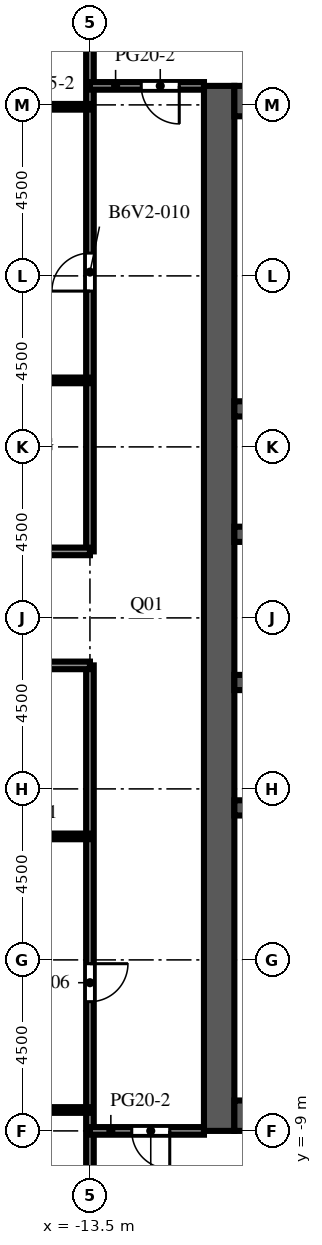
"""IFC4 building model, lengths in metres.
Left out: names, types, materials, properties, quantities, classifications, styles, units other than length and angle.
Written with IfcOpenShell. Run it as: python <this file> out.ifc"""

import sys

from ifc_helpers import new_model, si_unit, direction, frame, frame_2d, origin, place, context, subcontext, project, spatial, rectangle, extrude, element, fill, save


model = new_model("IFC4")
c1 = context("Model", 3, precision=1e-05, world=origin(), true_north=direction((0.0, 1.0)))
c2 = subcontext(c1, "Body", "Model", "MODEL_VIEW")
j1 = project(units=[si_unit("LENGTHUNIT", "METRE"), si_unit("PLANEANGLEUNIT", "RADIAN")], contexts=[c1])
p1 = place(None, origin())
s1 = spatial("IfcSite", under=j1, at=p1, CompositionType="ELEMENT")
p2 = place(p1, origin())
s2 = spatial("IfcBuilding", under=s1, at=p2, CompositionType="ELEMENT")
p3 = place(p2, frame((0.0, 0.0, 216.1)))
s3 = spatial("IfcBuildingStorey", under=s2, at=p3, CompositionType="ELEMENT", Elevation=216.1)
p4 = place(p3, frame((-10.1, -9.0, 0.0), z_axis=(0.0, 0.0, 1.0), x_axis=(0.0, 1.0, 0.0)))
e1 = element("IfcWall", 1, at=p4, inside=s3, PredefinedType="SHEAR", context=c2, shape_type="SweptSolid", body=[
    extrude(rectangle(XDim=27.5, YDim=0.8, at=frame_2d((13.75, 0.0))), origin(), (0.0, 0.0, 1.0), 4.1),
])
p5 = place(p4, frame((12.55, 0.0, 0.0)))
e2 = element("IfcOpeningElement", 2, at=p5, cuts=e1, PredefinedType="OPENING", context=c2, shape_type="SweptSolid", body=[
    extrude(rectangle(XDim=2.4, YDim=2.4, at=frame_2d((1.2, 1.2))), frame((0.0, 0.41, 0.0), z_axis=(0.0, -1.0, 0.0), x_axis=(1.0, 0.0, 0.0)), (0.0, 0.0, 1.0), 0.82),
])
p6 = place(p4, frame((6.825, 0.0, 0.0)))
e3 = element("IfcOpeningElement", 3, at=p6, cuts=e1, PredefinedType="OPENING", context=c2, shape_type="SweptSolid", body=[
    extrude(rectangle(XDim=1.2, YDim=2.1, at=frame_2d((0.6, 1.05))), frame((0.0, 0.41, 0.0), z_axis=(0.0, -1.0, 0.0), x_axis=(1.0, 0.0, 0.0)), (0.0, 0.0, 1.0), 0.82),
])
p7 = place(p4, frame((19.475, 0.0, 0.0)))
e4 = element("IfcOpeningElement", 4, at=p7, cuts=e1, PredefinedType="OPENING", context=c2, shape_type="SweptSolid", body=[
    extrude(rectangle(XDim=1.2, YDim=2.1, at=frame_2d((0.6, 1.05))), frame((0.0, 0.41, 0.0), z_axis=(0.0, -1.0, 0.0), x_axis=(1.0, 0.0, 0.0)), (0.0, 0.0, 1.0), 0.82),
])
for number, where, z_axis, x_axis in (
    (5, (-9.7, -8.6, 0.0), (0.0, 0.0, 1.0), (1.0, 0.0, 0.0)),
    (6, (-9.7, 18.1, 0.0), (0.0, 0.0, 1.0), (1.0, 0.0, 0.0)),
):
    element("IfcWall", number, at=place(p3, frame(where, z_axis=z_axis, x_axis=x_axis)), inside=s3, PredefinedType="SHEAR", context=c2, shape_type="SweptSolid", body=[
        extrude(rectangle(XDim=10.4, YDim=0.8, at=frame_2d((5.2, 0.0))), origin(), (0.0, 0.0, 1.0), 4.1),
    ])
p8 = place(p3, frame((-9.7, -0.5, 0.0), z_axis=(0.0, 0.0, 1.0), x_axis=(1.0, 0.0, 0.0)))
e7 = element("IfcWall", 7, at=p8, inside=s3, PredefinedType="SHEAR", context=c2, shape_type="SweptSolid", body=[
    extrude(rectangle(XDim=10.4, YDim=0.4, at=frame_2d((5.2, 0.0))), origin(), (0.0, 0.0, 1.0), 4.1),
])
p9 = place(p3, frame((-9.7, 2.8, 0.0), z_axis=(0.0, 0.0, 1.0), x_axis=(1.0, 0.0, 0.0)))
e8 = element("IfcWall", 8, at=p9, inside=s3, PredefinedType="SHEAR", context=c2, shape_type="SweptSolid", body=[
    extrude(rectangle(XDim=10.4, YDim=0.4, at=frame_2d((5.2, 0.0))), origin(), (0.0, 0.0, 1.0), 4.1),
])
p10 = place(p9, frame((0.738, 0.0, 0.0)))
e9 = element("IfcOpeningElement", 9, at=p10, cuts=e8, PredefinedType="OPENING", context=c2, shape_type="SweptSolid", body=[
    extrude(rectangle(XDim=1.1, YDim=2.1, at=frame_2d((0.55, 1.05))), frame((0.0, 0.21, 0.0), z_axis=(0.0, -1.0, 0.0), x_axis=(1.0, 0.0, 0.0)), (0.0, 0.0, 1.0), 0.42),
])
p11 = place(p9, frame((3.337, 0.0, 0.0)))
e10 = element("IfcOpeningElement", 10, at=p11, cuts=e8, PredefinedType="OPENING", context=c2, shape_type="SweptSolid", body=[
    extrude(rectangle(XDim=1.1, YDim=2.1, at=frame_2d((0.55, 1.05))), frame((0.0, 0.21, 0.0), z_axis=(0.0, -1.0, 0.0), x_axis=(1.0, 0.0, 0.0)), (0.0, 0.0, 1.0), 0.42),
])
p12 = place(p9, frame((6.012, 0.0, 0.0)))
e11 = element("IfcOpeningElement", 11, at=p12, cuts=e8, PredefinedType="OPENING", context=c2, shape_type="SweptSolid", body=[
    extrude(rectangle(XDim=1.0, YDim=2.1, at=frame_2d((0.5, 1.05))), frame((0.0, 0.21, 0.0), z_axis=(0.0, -1.0, 0.0), x_axis=(1.0, 0.0, 0.0)), (0.0, 0.0, 1.0), 0.42),
])
p13 = place(p9, frame((8.613, 0.0, 0.0)))
e12 = element("IfcOpeningElement", 12, at=p13, cuts=e8, PredefinedType="OPENING", context=c2, shape_type="SweptSolid", body=[
    extrude(rectangle(XDim=1.0, YDim=2.1, at=frame_2d((0.5, 1.05))), frame((0.0, 0.21, 0.0), z_axis=(0.0, -1.0, 0.0), x_axis=(1.0, 0.0, 0.0)), (0.0, 0.0, 1.0), 0.42),
])
p14 = place(p3, frame((-9.7, 6.7, 0.0), z_axis=(0.0, 0.0, 1.0), x_axis=(1.0, 0.0, 0.0)))
e13 = element("IfcWall", 13, at=p14, inside=s3, PredefinedType="SHEAR", context=c2, shape_type="SweptSolid", body=[
    extrude(rectangle(XDim=10.4, YDim=0.4, at=frame_2d((5.2, 0.0))), origin(), (0.0, 0.0, 1.0), 4.1),
])
p15 = place(p14, frame((3.337, 0.0, 0.0)))
e14 = element("IfcOpeningElement", 14, at=p15, cuts=e13, PredefinedType="OPENING", context=c2, shape_type="SweptSolid", body=[
    extrude(rectangle(XDim=1.1, YDim=2.1, at=frame_2d((0.55, 1.05))), frame((0.0, 0.21, 0.0), z_axis=(0.0, -1.0, 0.0), x_axis=(1.0, 0.0, 0.0)), (0.0, 0.0, 1.0), 0.42),
])
p16 = place(p14, frame((5.962, 0.0, 0.0)))
e15 = element("IfcOpeningElement", 15, at=p16, cuts=e13, PredefinedType="OPENING", context=c2, shape_type="SweptSolid", body=[
    extrude(rectangle(XDim=1.1, YDim=2.1, at=frame_2d((0.55, 1.05))), frame((0.0, 0.21, 0.0), z_axis=(0.0, -1.0, 0.0), x_axis=(1.0, 0.0, 0.0)), (0.0, 0.0, 1.0), 0.42),
])
p17 = place(p14, frame((8.663, 0.0, 0.0)))
e16 = element("IfcOpeningElement", 16, at=p17, cuts=e13, PredefinedType="OPENING", context=c2, shape_type="SweptSolid", body=[
    extrude(rectangle(XDim=1.1, YDim=2.1, at=frame_2d((0.55, 1.05))), frame((0.0, 0.21, 0.0), z_axis=(0.0, -1.0, 0.0), x_axis=(1.0, 0.0, 0.0)), (0.0, 0.0, 1.0), 0.42),
])
p18 = place(p14, frame((0.688, 0.0, 0.0)))
e17 = element("IfcOpeningElement", 17, at=p18, cuts=e13, PredefinedType="OPENING", context=c2, shape_type="SweptSolid", body=[
    extrude(rectangle(XDim=1.0, YDim=2.1, at=frame_2d((0.5, 1.05))), frame((0.0, 0.21, 0.0), z_axis=(0.0, -1.0, 0.0), x_axis=(1.0, 0.0, 0.0)), (0.0, 0.0, 1.0), 0.42),
])
p19 = place(p3, frame((-9.7, 10.0, 0.0), z_axis=(0.0, 0.0, 1.0), x_axis=(1.0, 0.0, 0.0)))
e18 = element("IfcWall", 18, at=p19, inside=s3, PredefinedType="SHEAR", context=c2, shape_type="SweptSolid", body=[
    extrude(rectangle(XDim=10.4, YDim=0.4, at=frame_2d((5.2, 0.0))), origin(), (0.0, 0.0, 1.0), 4.1),
])
p20 = place(p3, frame((-13.5, -26.5, 0.0), z_axis=(0.0, 0.0, 1.0), x_axis=(0.0, 1.0, 0.0)))
e19 = element("IfcWall", 19, at=p20, inside=s3, PredefinedType="PARTITIONING", context=c2, shape_type="SweptSolid", body=[
    extrude(rectangle(XDim=29.75, YDim=0.2, at=frame_2d((14.875, 0.0))), origin(), (0.0, 0.0, 1.0), 3.5),
])
p21 = place(p20, frame((20.9, 0.0, 0.0)))
e20 = element("IfcOpeningElement", 20, at=p21, cuts=e19, PredefinedType="OPENING", context=c2, shape_type="SweptSolid", body=[
    extrude(rectangle(XDim=1.0, YDim=2.1, at=frame_2d((0.5, 1.05))), frame((0.0, 0.11, 0.0), z_axis=(0.0, -1.0, 0.0), x_axis=(1.0, 0.0, 0.0)), (0.0, 0.0, 1.0), 0.22),
])
p22 = place(p3, frame((-13.5, 6.25, 0.0), z_axis=(0.0, 0.0, 1.0), x_axis=(0.0, 1.0, 0.0)))
e21 = element("IfcWall", 21, at=p22, inside=s3, PredefinedType="PARTITIONING", context=c2, shape_type="SweptSolid", body=[
    extrude(rectangle(XDim=20.25, YDim=0.2, at=frame_2d((10.125, 0.0))), origin(), (0.0, 0.0, 1.0), 3.5),
])
p23 = place(p22, frame((6.85, 0.0, 0.0)))
e22 = element("IfcOpeningElement", 22, at=p23, cuts=e21, PredefinedType="OPENING", context=c2, shape_type="SweptSolid", body=[
    extrude(rectangle(XDim=1.0, YDim=2.1, at=frame_2d((0.5, 1.05))), frame((0.0, 0.11, 0.0), z_axis=(0.0, -1.0, 0.0), x_axis=(1.0, 0.0, 0.0)), (0.0, 0.0, 1.0), 0.22),
])
p24 = place(p3, frame((-10.5, -9.0, 0.0), z_axis=(0.0, 0.0, 1.0), x_axis=(-1.0, 0.0, 0.0)))
e23 = element("IfcWall", 23, at=p24, inside=s3, PredefinedType="PARTITIONING", context=c2, shape_type="SweptSolid", body=[
    extrude(rectangle(XDim=3.0, YDim=0.2, at=frame_2d((1.5, 0.0))), origin(), (0.0, 0.0, 1.0), 3.5),
])
p25 = place(p24, frame((0.9, 0.0, 0.0)))
e24 = element("IfcOpeningElement", 24, at=p25, cuts=e23, PredefinedType="OPENING", context=c2, shape_type="SweptSolid", body=[
    extrude(rectangle(XDim=1.0, YDim=2.1, at=frame_2d((0.5, 1.05))), frame((0.0, 0.11, 0.0), z_axis=(0.0, -1.0, 0.0), x_axis=(1.0, 0.0, 0.0)), (0.0, 0.0, 1.0), 0.22),
])
p26 = place(p3, frame((-13.5, -8.45, 0.0), z_axis=(0.0, 0.0, 1.0), x_axis=(-1.0, 0.0, 0.0)))
e25 = element("IfcWall", 25, at=p26, inside=s3, PredefinedType="PARTITIONING", context=c2, shape_type="SweptSolid", body=[
    extrude(rectangle(XDim=3.9, YDim=0.15, at=frame_2d((1.95, 0.0))), origin(), (0.0, 0.0, 1.0), 3.5),
])
p27 = place(p26, frame((2.15, 0.0, 0.0)))
e26 = element("IfcOpeningElement", 26, at=p27, cuts=e25, PredefinedType="OPENING", context=c2, shape_type="SweptSolid", body=[
    extrude(rectangle(XDim=1.0, YDim=2.1, at=frame_2d((0.5, 1.05))), frame((0.0, 0.085, 0.0), z_axis=(0.0, -1.0, 0.0), x_axis=(1.0, 0.0, 0.0)), (0.0, 0.0, 1.0), 0.17),
])
p28 = place(p3, frame((-13.5, -1.25, 0.0), z_axis=(0.0, 0.0, 1.0), x_axis=(-1.0, 0.0, 0.0)))
e27 = element("IfcWall", 27, at=p28, inside=s3, PredefinedType="PARTITIONING", context=c2, shape_type="SweptSolid", body=[
    extrude(rectangle(XDim=8.85, YDim=0.15, at=frame_2d((4.425, 0.0))), origin(), (0.0, 0.0, 1.0), 3.5),
])
p29 = place(p28, frame((6.65, 0.0, 0.0)))
e28 = element("IfcOpeningElement", 28, at=p29, cuts=e27, PredefinedType="OPENING", context=c2, shape_type="SweptSolid", body=[
    extrude(rectangle(XDim=1.0, YDim=2.1, at=frame_2d((0.5, 1.05))), frame((0.0, 0.085, 0.0), z_axis=(0.0, -1.0, 0.0), x_axis=(1.0, 0.0, 0.0)), (0.0, 0.0, 1.0), 0.17),
])
p30 = place(p28, frame((1.4, 0.0, 0.0)))
e29 = element("IfcOpeningElement", 29, at=p30, cuts=e27, PredefinedType="OPENING", context=c2, shape_type="SweptSolid", body=[
    extrude(rectangle(XDim=1.0, YDim=2.1, at=frame_2d((0.5, 1.05))), frame((0.0, 0.085, 0.0), z_axis=(0.0, -1.0, 0.0), x_axis=(1.0, 0.0, 0.0)), (0.0, 0.0, 1.0), 0.17),
])
p31 = place(p3, frame((-13.5, 3.25, 0.0), z_axis=(0.0, 0.0, 1.0), x_axis=(-1.0, 0.0, 0.0)))
e30 = element("IfcWall", 30, at=p31, inside=s3, PredefinedType="PARTITIONING", context=c2, shape_type="SweptSolid", body=[
    extrude(rectangle(XDim=8.85, YDim=0.2, at=frame_2d((4.425, 0.0))), origin(), (0.0, 0.0, 1.0), 3.5),
])
p32 = place(p31, frame((6.65, 0.0, 0.0)))
e31 = element("IfcOpeningElement", 31, at=p32, cuts=e30, PredefinedType="OPENING", context=c2, shape_type="SweptSolid", body=[
    extrude(rectangle(XDim=1.0, YDim=2.1, at=frame_2d((0.5, 1.05))), frame((0.0, 0.11, 0.0), z_axis=(0.0, -1.0, 0.0), x_axis=(1.0, 0.0, 0.0)), (0.0, 0.0, 1.0), 0.22),
])
p33 = place(p3, frame((-22.35, 6.25, 0.0), z_axis=(0.0, 0.0, 1.0), x_axis=(1.0, 0.0, 0.0)))
e32 = element("IfcWall", 32, at=p33, inside=s3, PredefinedType="PARTITIONING", context=c2, shape_type="SweptSolid", body=[
    extrude(rectangle(XDim=8.85, YDim=0.2, at=frame_2d((4.425, 0.0))), origin(), (0.0, 0.0, 1.0), 3.5),
])
p34 = place(p33, frame((1.2, 0.0, 0.0)))
e33 = element("IfcOpeningElement", 33, at=p34, cuts=e32, PredefinedType="OPENING", context=c2, shape_type="SweptSolid", body=[
    extrude(rectangle(XDim=1.0, YDim=2.1, at=frame_2d((0.5, 1.05))), frame((0.0, 0.11, 0.0), z_axis=(0.0, -1.0, 0.0), x_axis=(1.0, 0.0, 0.0)), (0.0, 0.0, 1.0), 0.22),
])
p35 = place(p3, frame((-22.35, 10.75, 0.0), z_axis=(0.0, 0.0, 1.0), x_axis=(1.0, 0.0, 0.0)))
e34 = element("IfcWall", 34, at=p35, inside=s3, PredefinedType="PARTITIONING", context=c2, shape_type="SweptSolid", body=[
    extrude(rectangle(XDim=8.85, YDim=0.15, at=frame_2d((4.425, 0.0))), origin(), (0.0, 0.0, 1.0), 3.5),
])
p36 = place(p35, frame((1.2, 0.0, 0.0)))
e35 = element("IfcOpeningElement", 35, at=p36, cuts=e34, PredefinedType="OPENING", context=c2, shape_type="SweptSolid", body=[
    extrude(rectangle(XDim=1.0, YDim=2.1, at=frame_2d((0.5, 1.05))), frame((0.0, 0.085, 0.0), z_axis=(0.0, -1.0, 0.0), x_axis=(1.0, 0.0, 0.0)), (0.0, 0.0, 1.0), 0.17),
])
p37 = place(p35, frame((5.7, 0.0, 0.0)))
e36 = element("IfcOpeningElement", 36, at=p37, cuts=e34, PredefinedType="OPENING", context=c2, shape_type="SweptSolid", body=[
    extrude(rectangle(XDim=1.0, YDim=2.1, at=frame_2d((0.5, 1.05))), frame((0.0, 0.085, 0.0), z_axis=(0.0, -1.0, 0.0), x_axis=(1.0, 0.0, 0.0)), (0.0, 0.0, 1.0), 0.17),
])
p38 = place(p3, frame((-17.4, 17.95, 0.0), z_axis=(0.0, 0.0, 1.0), x_axis=(1.0, 0.0, 0.0)))
e37 = element("IfcWall", 37, at=p38, inside=s3, PredefinedType="PARTITIONING", context=c2, shape_type="SweptSolid", body=[
    extrude(rectangle(XDim=3.9, YDim=0.15, at=frame_2d((1.95, 0.0))), origin(), (0.0, 0.0, 1.0), 3.5),
])
p39 = place(p38, frame((0.5, 0.0, 0.0)))
e38 = element("IfcOpeningElement", 38, at=p39, cuts=e37, PredefinedType="OPENING", context=c2, shape_type="SweptSolid", body=[
    extrude(rectangle(XDim=1.0, YDim=2.1, at=frame_2d((0.5, 1.05))), frame((0.0, 0.085, 0.0), z_axis=(0.0, -1.0, 0.0), x_axis=(1.0, 0.0, 0.0)), (0.0, 0.0, 1.0), 0.17),
])
p40 = place(p3, frame((-13.5, 18.5, 0.0), z_axis=(0.0, 0.0, 1.0), x_axis=(1.0, 0.0, 0.0)))
e39 = element("IfcWall", 39, at=p40, inside=s3, PredefinedType="PARTITIONING", context=c2, shape_type="SweptSolid", body=[
    extrude(rectangle(XDim=3.0, YDim=0.2, at=frame_2d((1.5, 0.0))), origin(), (0.0, 0.0, 1.0), 3.5),
])
p41 = place(p40, frame((1.35, 0.0, 0.0)))
e40 = element("IfcOpeningElement", 40, at=p41, cuts=e39, PredefinedType="OPENING", context=c2, shape_type="SweptSolid", body=[
    extrude(rectangle(XDim=1.0, YDim=2.1, at=frame_2d((0.5, 1.05))), frame((0.0, 0.11, 0.0), z_axis=(0.0, -1.0, 0.0), x_axis=(1.0, 0.0, 0.0)), (0.0, 0.0, 1.0), 0.22),
])
p42 = place(p5, origin())
e41 = element("IfcDoor", 41, at=p42, inside=s3, OperationType="DOUBLE_DOOR_DOUBLE_SWING", PredefinedType="DOOR", context=c2, shape_type="SweptSolid", body=[
    extrude(rectangle(XDim=2.4, YDim=2.4, at=frame_2d((1.2, 1.2))), frame((0.0, 0.025, 0.0), z_axis=(0.0, -1.0, 0.0), x_axis=(1.0, 0.0, 0.0)), (0.0, 0.0, 1.0), 0.05),
])
fill(e2, e41)
p43 = place(p6, origin())
e42 = element("IfcDoor", 42, at=p43, inside=s3, OperationType="SINGLE_SWING_LEFT", PredefinedType="DOOR", context=c2, shape_type="SweptSolid", body=[
    extrude(rectangle(XDim=1.2, YDim=2.1, at=frame_2d((0.6, 1.05))), frame((0.0, 0.025, 0.0), z_axis=(0.0, -1.0, 0.0), x_axis=(1.0, 0.0, 0.0)), (0.0, 0.0, 1.0), 0.05),
])
fill(e3, e42)
p44 = place(p7, origin())
e43 = element("IfcDoor", 43, at=p44, inside=s3, OperationType="SINGLE_SWING_LEFT", PredefinedType="DOOR", context=c2, shape_type="SweptSolid", body=[
    extrude(rectangle(XDim=1.2, YDim=2.1, at=frame_2d((0.6, 1.05))), frame((0.0, 0.025, 0.0), z_axis=(0.0, -1.0, 0.0), x_axis=(1.0, 0.0, 0.0)), (0.0, 0.0, 1.0), 0.05),
])
fill(e4, e43)
p45 = place(p21, origin())
e44 = element("IfcDoor", 44, at=p45, inside=s3, OperationType="SINGLE_SWING_RIGHT", PredefinedType="DOOR", context=c2, shape_type="SweptSolid", body=[
    extrude(rectangle(XDim=1.0, YDim=2.1, at=frame_2d((0.5, 1.05))), frame((0.0, 0.025, 0.0), z_axis=(0.0, -1.0, 0.0), x_axis=(1.0, 0.0, 0.0)), (0.0, 0.0, 1.0), 0.05),
])
fill(e20, e44)
p46 = place(p23, origin())
e45 = element("IfcDoor", 45, at=p46, inside=s3, OperationType="SINGLE_SWING_LEFT", PredefinedType="DOOR", context=c2, shape_type="SweptSolid", body=[
    extrude(rectangle(XDim=1.0, YDim=2.1, at=frame_2d((0.5, 1.05))), frame((0.0, 0.025, 0.0), z_axis=(0.0, -1.0, 0.0), x_axis=(1.0, 0.0, 0.0)), (0.0, 0.0, 1.0), 0.05),
])
fill(e22, e45)
p47 = place(p25, origin())
e46 = element("IfcDoor", 46, at=p47, inside=s3, OperationType="SINGLE_SWING_LEFT", PredefinedType="DOOR", context=c2, shape_type="SweptSolid", body=[
    extrude(rectangle(XDim=1.0, YDim=2.1, at=frame_2d((0.5, 1.05))), frame((0.0, 0.025, 0.0), z_axis=(0.0, -1.0, 0.0), x_axis=(1.0, 0.0, 0.0)), (0.0, 0.0, 1.0), 0.05),
])
fill(e24, e46)
p48 = place(p41, origin())
e47 = element("IfcDoor", 47, at=p48, inside=s3, OperationType="SINGLE_SWING_RIGHT", PredefinedType="DOOR", context=c2, shape_type="SweptSolid", body=[
    extrude(rectangle(XDim=1.0, YDim=2.1, at=frame_2d((0.5, 1.05))), frame((0.0, 0.025, 0.0), z_axis=(0.0, -1.0, 0.0), x_axis=(1.0, 0.0, 0.0)), (0.0, 0.0, 1.0), 0.05),
])
fill(e40, e47)
save(model, sys.argv[1])
